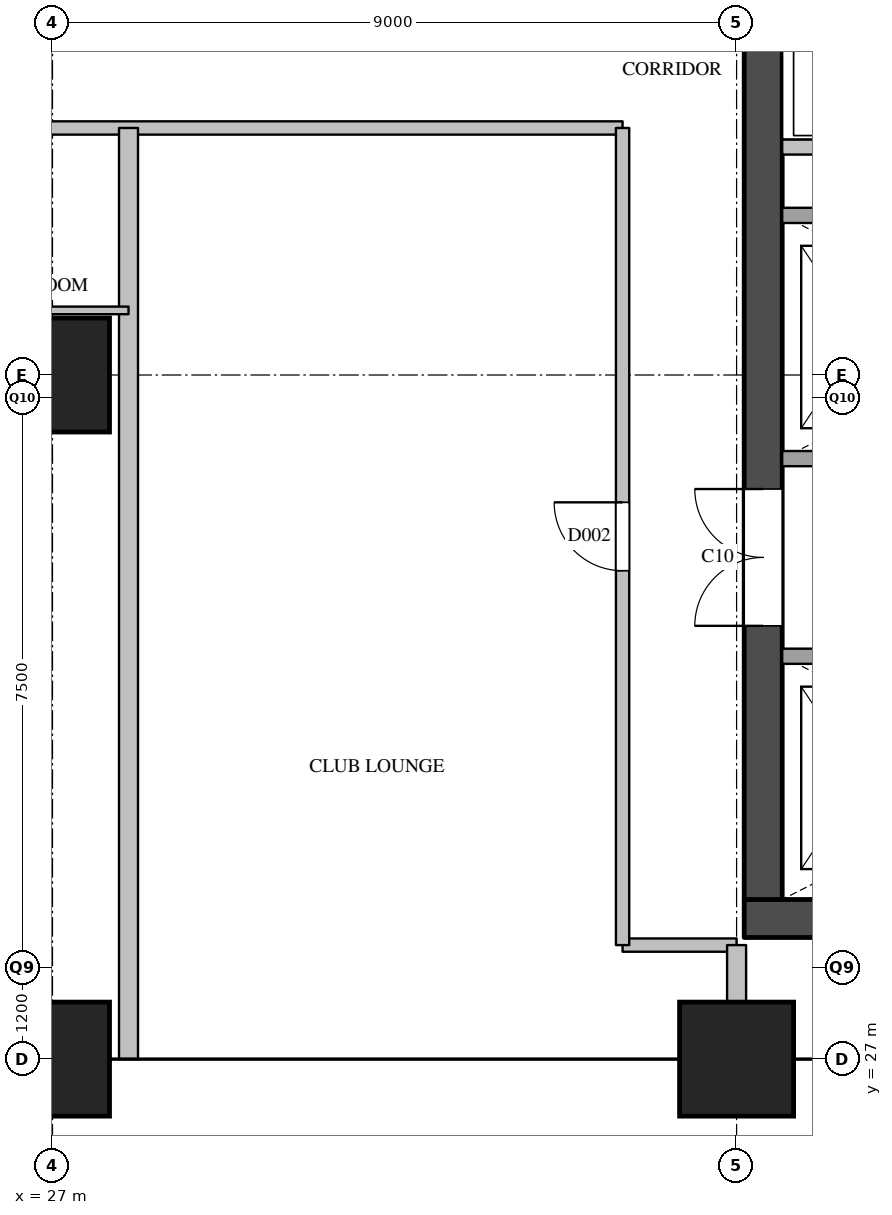
"""IFC4 building model, lengths in metres.
Left out: names, types, materials, properties, quantities, classifications, styles, units other than length and angle.
Written with IfcOpenShell. Run it as: python <this file> out.ifc"""

import sys

from ifc_helpers import new_model, si_unit, direction, frame, frame_2d, origin, origin_2d, place, context, subcontext, project, spatial, rectangle, extrude, element, fill, save


model = new_model("IFC4")
c1 = context("Model", 3, precision=1e-05, world=origin(), true_north=direction((0.0, 1.0)))
c2 = subcontext(c1, "Body", "Model", "MODEL_VIEW")
j1 = project(units=[si_unit("LENGTHUNIT", "METRE"), si_unit("PLANEANGLEUNIT", "RADIAN")], contexts=[c1])
p1 = place(None, origin())
s1 = spatial("IfcSite", under=j1, at=p1, CompositionType="ELEMENT")
p2 = place(p1, origin())
s2 = spatial("IfcBuilding", under=s1, at=p2, CompositionType="ELEMENT")
p3 = place(p2, frame((0.0, 0.0, 173.9)))
s3 = spatial("IfcBuildingStorey", under=s2, at=p3, CompositionType="ELEMENT", Elevation=173.9)
for number, where, z_axis, x_axis in (
    (1, (27.0, 27.0, 0.0), (0.0, 0.0, 1.0), (1.0, 0.0, 0.0)),
    (2, (27.0, 36.0, 0.0), (0.0, 0.0, 1.0), (1.0, 0.0, 0.0)),
    (3, (36.0, 27.0, 0.0), (0.0, 0.0, 1.0), (1.0, 0.0, 0.0)),
):
    element("IfcColumn", number, at=place(p3, frame(where, z_axis=z_axis, x_axis=x_axis)), inside=s3, PredefinedType="COLUMN", context=c2, shape_type="SweptSolid", body=[
        extrude(rectangle(XDim=1.5, YDim=1.5, at=origin_2d()), origin(), (0.0, 0.0, 1.0), 3.9),
    ])
p4 = place(p3, frame((36.1, 28.85, 0.0), z_axis=(0.0, 0.0, 1.0), x_axis=(1.0, 0.0, 0.0)))
e4 = element("IfcWall", 4, at=p4, inside=s3, PredefinedType="SHEAR", context=c2, shape_type="SweptSolid", body=[
    extrude(rectangle(XDim=12.2, YDim=0.5, at=frame_2d((6.1, 0.0))), origin(), (0.0, 0.0, 1.0), 3.6),
])
p5 = place(p4, frame((0.95, 0.0, 0.0)))
e5 = element("IfcOpeningElement", 5, at=p5, cuts=e4, PredefinedType="OPENING", context=c2, shape_type="SweptSolid", body=[
    extrude(rectangle(XDim=1.2, YDim=2.1, at=frame_2d((0.6, 1.05))), frame((0.0, 0.26, 0.0), z_axis=(0.0, -1.0, 0.0), x_axis=(1.0, 0.0, 0.0)), (0.0, 0.0, 1.0), 0.52),
])
p6 = place(p4, frame((3.05, 0.0, 0.0)))
e6 = element("IfcOpeningElement", 6, at=p6, cuts=e4, PredefinedType="OPENING", context=c2, shape_type="SweptSolid", body=[
    extrude(rectangle(XDim=1.2, YDim=2.1, at=frame_2d((0.6, 1.05))), frame((0.0, 0.26, 0.0), z_axis=(0.0, -1.0, 0.0), x_axis=(1.0, 0.0, 0.0)), (0.0, 0.0, 1.0), 0.52),
])
p7 = place(p4, frame((5.15, 0.0, 0.0)))
e7 = element("IfcOpeningElement", 7, at=p7, cuts=e4, PredefinedType="OPENING", context=c2, shape_type="SweptSolid", body=[
    extrude(rectangle(XDim=1.2, YDim=2.1, at=frame_2d((0.6, 1.05))), frame((0.0, 0.26, 0.0), z_axis=(0.0, -1.0, 0.0), x_axis=(1.0, 0.0, 0.0)), (0.0, 0.0, 1.0), 0.52),
])
p8 = place(p3, frame((36.35, 29.1, 0.0), z_axis=(0.0, 0.0, 1.0), x_axis=(0.0, 1.0, 0.0)))
e8 = element("IfcWall", 8, at=p8, inside=s3, PredefinedType="SHEAR", context=c2, shape_type="SweptSolid", body=[
    extrude(rectangle(XDim=20.3, YDim=0.5, at=frame_2d((10.15, 0.0))), origin(), (0.0, 0.0, 1.0), 3.6),
])
p9 = place(p8, frame((3.6, 0.0, 0.0)))
e9 = element("IfcOpeningElement", 9, at=p9, cuts=e8, PredefinedType="OPENING", context=c2, shape_type="SweptSolid", body=[
    extrude(rectangle(XDim=1.8, YDim=2.1, at=frame_2d((0.9, 1.05))), frame((0.0, 0.26, 0.0), z_axis=(0.0, -1.0, 0.0), x_axis=(1.0, 0.0, 0.0)), (0.0, 0.0, 1.0), 0.52),
])
p10 = place(p8, frame((16.4, 0.0, 0.0)))
e10 = element("IfcOpeningElement", 10, at=p10, cuts=e8, PredefinedType="OPENING", context=c2, shape_type="SweptSolid", body=[
    extrude(rectangle(XDim=1.0, YDim=2.1, at=frame_2d((0.5, 1.05))), frame((0.0, 0.26, 0.0), z_axis=(0.0, -1.0, 0.0), x_axis=(1.0, 0.0, 0.0)), (0.0, 0.0, 1.0), 0.52),
])
p11 = place(p3, frame((36.6, 32.3, 0.0), z_axis=(0.0, 0.0, 1.0), x_axis=(1.0, 0.0, 0.0)))
e11 = element("IfcWall", 11, at=p11, inside=s3, PredefinedType="SOLIDWALL", context=c2, shape_type="SweptSolid", body=[
    extrude(rectangle(XDim=11.2, YDim=0.2, at=frame_2d((5.6, 0.0))), origin(), (0.0, 0.0, 1.0), 3.6),
])
p12 = place(p11, frame((7.225, 0.0, 0.0)))
e12 = element("IfcOpeningElement", 12, at=p12, cuts=e11, PredefinedType="OPENING", context=c2, shape_type="SweptSolid", body=[
    extrude(rectangle(XDim=1.2, YDim=2.1, at=frame_2d((0.6, 1.05))), frame((0.0, 0.11, 0.0), z_axis=(0.0, -1.0, 0.0), x_axis=(1.0, 0.0, 0.0)), (0.0, 0.0, 1.0), 0.22),
])
p13 = place(p11, frame((9.475, 0.0, 0.0)))
e13 = element("IfcOpeningElement", 13, at=p13, cuts=e11, PredefinedType="OPENING", context=c2, shape_type="SweptSolid", body=[
    extrude(rectangle(XDim=1.2, YDim=2.1, at=frame_2d((0.6, 1.05))), frame((0.0, 0.11, 0.0), z_axis=(0.0, -1.0, 0.0), x_axis=(1.0, 0.0, 0.0)), (0.0, 0.0, 1.0), 0.22),
])
p14 = place(p3, frame((36.6, 34.9, 0.0), z_axis=(0.0, 0.0, 1.0), x_axis=(1.0, 0.0, 0.0)))
e14 = element("IfcWall", 14, at=p14, inside=s3, PredefinedType="SOLIDWALL", context=c2, shape_type="SweptSolid", body=[
    extrude(rectangle(XDim=6.3, YDim=0.2, at=frame_2d((3.15, 0.0))), origin(), (0.0, 0.0, 1.0), 3.6),
])
p15 = place(p3, frame((36.6, 38.1, 0.0), z_axis=(0.0, 0.0, 1.0), x_axis=(1.0, 0.0, 0.0)))
e15 = element("IfcWall", 15, at=p15, inside=s3, PredefinedType="SOLIDWALL", context=c2, shape_type="SweptSolid", body=[
    extrude(rectangle(XDim=6.7, YDim=0.2, at=frame_2d((3.35, 0.0))), origin(), (0.0, 0.0, 1.0), 3.6),
])
p16 = place(p15, frame((0.45, 0.0, 0.0)))
e16 = element("IfcOpeningElement", 16, at=p16, cuts=e15, PredefinedType="OPENING", context=c2, shape_type="SweptSolid", body=[
    extrude(rectangle(XDim=1.2, YDim=2.1, at=frame_2d((0.6, 1.05))), frame((0.0, 0.11, 0.0), z_axis=(0.0, -1.0, 0.0), x_axis=(1.0, 0.0, 0.0)), (0.0, 0.0, 1.0), 0.22),
])
p17 = place(p15, frame((2.55, 0.0, 0.0)))
e17 = element("IfcOpeningElement", 17, at=p17, cuts=e15, PredefinedType="OPENING", context=c2, shape_type="SweptSolid", body=[
    extrude(rectangle(XDim=1.2, YDim=2.1, at=frame_2d((0.6, 1.05))), frame((0.0, 0.11, 0.0), z_axis=(0.0, -1.0, 0.0), x_axis=(1.0, 0.0, 0.0)), (0.0, 0.0, 1.0), 0.22),
])
p18 = place(p15, frame((4.65, 0.0, 0.0)))
e18 = element("IfcOpeningElement", 18, at=p18, cuts=e15, PredefinedType="OPENING", context=c2, shape_type="SweptSolid", body=[
    extrude(rectangle(XDim=1.2, YDim=2.1, at=frame_2d((0.6, 1.05))), frame((0.0, 0.11, 0.0), z_axis=(0.0, -1.0, 0.0), x_axis=(1.0, 0.0, 0.0)), (0.0, 0.0, 1.0), 0.22),
])
p19 = place(p3, frame((36.6, 39.0, 0.0), z_axis=(0.0, 0.0, 1.0), x_axis=(1.0, 0.0, 0.0)))
e19 = element("IfcWall", 19, at=p19, inside=s3, PredefinedType="SOLIDWALL", context=c2, shape_type="SweptSolid", body=[
    extrude(rectangle(XDim=3.25, YDim=0.2, at=frame_2d((1.625, 0.0))), origin(), (0.0, 0.0, 1.0), 3.6),
])
p20 = place(p3, frame((34.5, 28.5, 0.0), z_axis=(0.0, 0.0, 1.0), x_axis=(1.0, 0.0, 0.0)))
e20 = element("IfcWall", 20, at=p20, inside=s3, PredefinedType="PARTITIONING", context=c2, shape_type="SweptSolid", body=[
    extrude(rectangle(XDim=1.5, YDim=0.175, at=frame_2d((0.75, 0.0))), origin(), (0.0, 0.0, 1.0), 3.6),
])
p21 = place(p3, frame((19.5, 39.25, 0.0), z_axis=(0.0, 0.0, 1.0), x_axis=(1.0, 0.0, 0.0)))
e21 = element("IfcWall", 21, at=p21, inside=s3, PredefinedType="PARTITIONING", context=c2, shape_type="SweptSolid", body=[
    extrude(rectangle(XDim=15.0, YDim=0.175, at=frame_2d((7.5, 0.0))), origin(), (0.0, 0.0, 1.0), 2.6),
])
p22 = place(p21, frame((3.1, 0.0, 0.0)))
e22 = element("IfcOpeningElement", 22, at=p22, cuts=e21, PredefinedType="OPENING", context=c2, shape_type="SweptSolid", body=[
    extrude(rectangle(XDim=1.0, YDim=2.1, at=frame_2d((0.5, 1.05))), frame((0.0, 0.097, 0.0), z_axis=(0.0, -1.0, 0.0), x_axis=(1.0, 0.0, 0.0)), (0.0, 0.0, 1.0), 0.195),
])
p23 = place(p21, frame((4.9, 0.0, 0.0)))
e23 = element("IfcOpeningElement", 23, at=p23, cuts=e21, PredefinedType="OPENING", context=c2, shape_type="SweptSolid", body=[
    extrude(rectangle(XDim=1.0, YDim=2.1, at=frame_2d((0.5, 1.05))), frame((0.0, 0.097, 0.0), z_axis=(0.0, -1.0, 0.0), x_axis=(1.0, 0.0, 0.0)), (0.0, 0.0, 1.0), 0.195),
])
p24 = place(p3, frame((34.5, 28.5, 0.0), z_axis=(0.0, 0.0, 1.0), x_axis=(0.0, 1.0, 0.0)))
e24 = element("IfcWall", 24, at=p24, inside=s3, PredefinedType="PARTITIONING", context=c2, shape_type="SweptSolid", body=[
    extrude(rectangle(XDim=10.75, YDim=0.175, at=frame_2d((5.375, 0.0))), origin(), (0.0, 0.0, 1.0), 3.6),
])
p25 = place(p24, frame((4.925, 0.0, 0.0)))
e25 = element("IfcOpeningElement", 25, at=p25, cuts=e24, PredefinedType="OPENING", context=c2, shape_type="SweptSolid", body=[
    extrude(rectangle(XDim=0.9, YDim=2.1, at=frame_2d((0.45, 1.05))), frame((0.0, 0.097, 0.0), z_axis=(0.0, -1.0, 0.0), x_axis=(1.0, 0.0, 0.0)), (0.0, 0.0, 1.0), 0.195),
])
p26 = place(p3, frame((28.0, 27.0, 0.0), z_axis=(0.0, 0.0, 1.0), x_axis=(0.0, 1.0, 0.0)))
e26 = element("IfcWall", 26, at=p26, inside=s3, PredefinedType="PARTITIONING", context=c2, shape_type="SweptSolid", body=[
    extrude(rectangle(XDim=12.25, YDim=0.25, at=frame_2d((6.125, 0.0))), origin(), (0.0, 0.0, 1.0), 2.6),
])
p27 = place(p3, frame((36.0, 27.0, 0.0), z_axis=(0.0, 0.0, 1.0), x_axis=(0.0, 1.0, 0.0)))
e27 = element("IfcWall", 27, at=p27, inside=s3, PredefinedType="PARTITIONING", context=c2, shape_type="SweptSolid", body=[
    extrude(rectangle(XDim=1.5, YDim=0.25, at=frame_2d((0.75, 0.0))), origin(), (0.0, 0.0, 1.0), 3.6),
])
p28 = place(p3, frame((25.8, 36.85, 0.0), z_axis=(0.0, 0.0, 1.0), x_axis=(1.0, 0.0, 0.0)))
e28 = element("IfcWall", 28, at=p28, inside=s3, PredefinedType="PARTITIONING", context=c2, shape_type="SweptSolid", body=[
    extrude(rectangle(XDim=2.2, YDim=0.1, at=frame_2d((1.1, 0.0))), origin(), (0.0, 0.0, 1.0), 2.6),
])
p29 = place(p9, origin())
e29 = element("IfcDoor", 29, at=p29, inside=s3, OperationType="DOUBLE_DOOR_SINGLE_SWING", PredefinedType="DOOR", context=c2, shape_type="SweptSolid", body=[
    extrude(rectangle(XDim=1.8, YDim=2.1, at=frame_2d((0.9, 1.05))), frame((0.0, 0.025, 0.0), z_axis=(0.0, -1.0, 0.0), x_axis=(1.0, 0.0, 0.0)), (0.0, 0.0, 1.0), 0.05),
])
fill(e9, e29)
p30 = place(p25, origin())
e30 = element("IfcDoor", 30, at=p30, inside=s3, OperationType="SINGLE_SWING_RIGHT", PredefinedType="DOOR", context=c2, shape_type="SweptSolid", body=[
    extrude(rectangle(XDim=0.9, YDim=2.1, at=frame_2d((0.45, 1.05))), frame((0.0, 0.025, 0.0), z_axis=(0.0, -1.0, 0.0), x_axis=(1.0, 0.0, 0.0)), (0.0, 0.0, 1.0), 0.05),
])
fill(e25, e30)
save(model, sys.argv[1])
